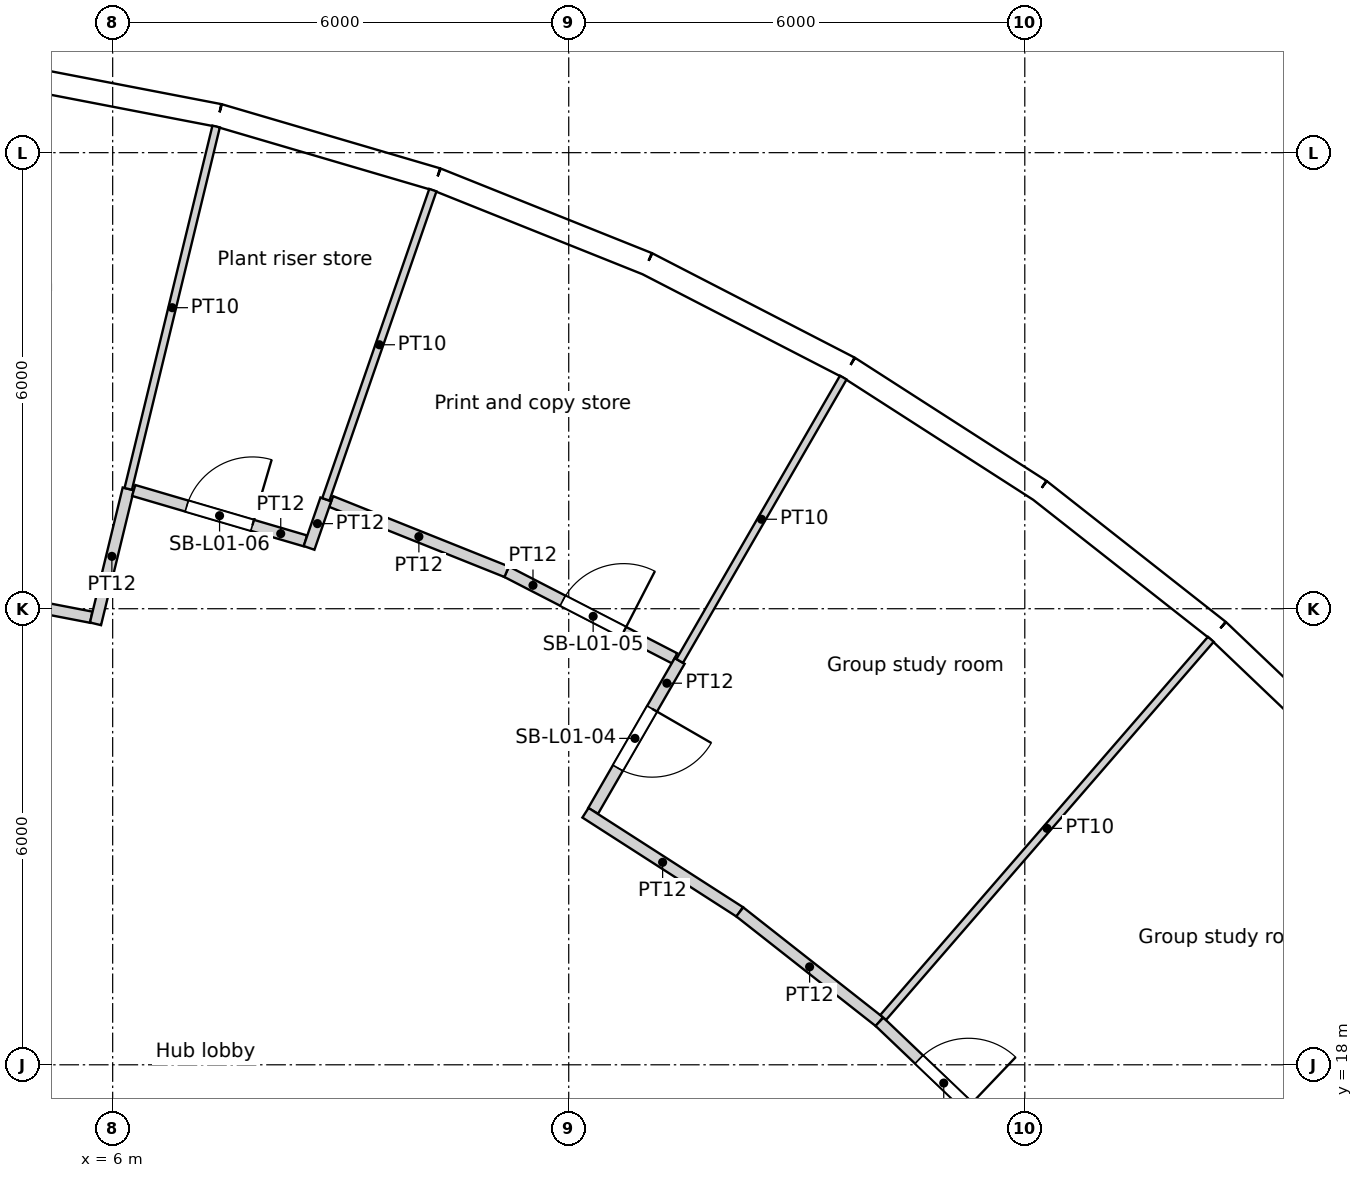
"""IFC4 building model, lengths in metres.
Left out: names, types, materials, properties, quantities, classifications, styles, units other than length and angle.
Written with IfcOpenShell. Run it as: python <this file> out.ifc"""

import sys

from ifc_helpers import new_model, si_unit, direction, frame, frame_2d, origin, origin_2d, place, context, subcontext, project, spatial, rectangle, circle, extrude, element, fill, save


model = new_model("IFC4")
c1 = context("Model", 3, precision=1e-05, world=origin(), true_north=direction((0.0, 1.0)))
c2 = subcontext(c1, "Body", "Model", "MODEL_VIEW")
j1 = project(units=[si_unit("LENGTHUNIT", "METRE"), si_unit("PLANEANGLEUNIT", "RADIAN")], contexts=[c1])
p1 = place(None, origin())
s1 = spatial("IfcSite", under=j1, at=p1, CompositionType="ELEMENT")
p2 = place(p1, origin())
s2 = spatial("IfcBuilding", under=s1, at=p2, CompositionType="ELEMENT")
p3 = place(p2, frame((0.0, 0.0, 9.0)))
s3 = spatial("IfcBuildingStorey", under=s2, at=p3, CompositionType="ELEMENT", Elevation=9.0)
for number, where, z_axis, x_axis in (
    (1, (21.911, 20.892, 0.0), (0.0, 0.0, 1.0), (1.0, 0.0, 0.0)),
    (2, (17.561, 24.661, 0.0), (0.0, 0.0, 1.0), (1.0, 0.0, 0.0)),
    (3, (12.576, 27.539, 0.0), (0.0, 0.0, 1.0), (1.0, 0.0, 0.0)),
    (4, (7.137, 29.421, 0.0), (0.0, 0.0, 1.0), (1.0, 0.0, 0.0)),
):
    element("IfcColumn", number, at=place(p3, frame(where, z_axis=z_axis, x_axis=x_axis)), inside=s3, PredefinedType="COLUMN", context=c2, shape_type="SweptSolid", body=[
        extrude(circle(Radius=0.7, at=origin_2d()), origin(), (0.0, 0.0, 1.0), 4.8),
    ])
for number, where, z_axis, x_axis in (
    (5, (14.659, 19.69, 0.0), (0.0, 0.0, 1.0), (1.0, 0.0, 0.0)),
    (6, (9.723, 22.54, 0.0), (0.0, 0.0, 1.0), (1.0, 0.0, 0.0)),
):
    element("IfcColumn", number, at=place(p3, frame(where, z_axis=z_axis, x_axis=x_axis)), inside=s3, PredefinedType="COLUMN", context=c2, shape_type="SweptSolid", body=[
        extrude(circle(Radius=0.75, at=origin_2d()), origin(), (0.0, 0.0, 1.0), 4.8),
    ])
p4 = place(p3, frame((6.876, 17.521, 0.0), z_axis=(0.0, 0.0, 1.0), x_axis=(1.0, 0.0, 0.0)))
e7 = element("IfcColumn", 7, at=p4, inside=s3, PredefinedType="COLUMN", context=c2, shape_type="SweptSolid", body=[
    extrude(circle(Radius=0.8, at=origin_2d()), origin(), (0.0, 0.0, 1.0), 4.8),
])
p5 = place(p3, frame((22.707, 21.651, 0.0), z_axis=(0.0, 0.0, 1.0), x_axis=(-0.723750841228, 0.690061388444, 0.0)))
e8 = element("IfcWall", 8, at=p5, inside=s3, PredefinedType="SOLIDWALL", context=c2, shape_type="SweptSolid", body=[
    extrude(rectangle(XDim=2.986, YDim=0.3, at=frame_2d((1.493, 0.0))), origin(), (0.0, 0.0, 1.0), 4.35),
])
p6 = place(p5, frame((1.493, 0.0, 2.0)))
e9 = element("IfcOpeningElement", 9, at=p6, cuts=e8, PredefinedType="OPENING", context=c2, shape_type="SweptSolid", body=[
    extrude(circle(Radius=1.2, at=origin_2d()), frame((0.0, 0.16, 0.0), z_axis=(0.0, -1.0, 0.0), x_axis=(1.0, 0.0, 0.0)), (0.0, 0.0, 1.0), 0.32),
])
p7 = place(p3, frame((20.546, 23.711, 0.0), z_axis=(0.0, 0.0, 1.0), x_axis=(-0.786043032847, 0.618171780747, 0.0)))
e10 = element("IfcWall", 10, at=p7, inside=s3, PredefinedType="SOLIDWALL", context=c2, shape_type="SweptSolid", body=[
    extrude(rectangle(XDim=2.986, YDim=0.3, at=frame_2d((1.493, 0.0))), origin(), (0.0, 0.0, 1.0), 4.35),
])
p8 = place(p7, frame((1.493, 0.0, 2.0)))
e11 = element("IfcOpeningElement", 11, at=p8, cuts=e10, PredefinedType="OPENING", context=c2, shape_type="SweptSolid", body=[
    extrude(circle(Radius=1.2, at=origin_2d()), frame((0.0, 0.16, 0.0), z_axis=(0.0, -1.0, 0.0), x_axis=(1.0, 0.0, 0.0)), (0.0, 0.0, 1.0), 0.32),
])
p9 = place(p3, frame((18.199, 25.557, 0.0), z_axis=(0.0, 0.0, 1.0), x_axis=(-0.841242231846, 0.540658401727, 0.0)))
e12 = element("IfcWall", 12, at=p9, inside=s3, PredefinedType="SOLIDWALL", context=c2, shape_type="SweptSolid", body=[
    extrude(rectangle(XDim=2.986, YDim=0.3, at=frame_2d((1.493, 0.0))), origin(), (0.0, 0.0, 1.0), 4.35),
])
p10 = place(p9, frame((1.493, 0.0, 2.0)))
e13 = element("IfcOpeningElement", 13, at=p10, cuts=e12, PredefinedType="OPENING", context=c2, shape_type="SweptSolid", body=[
    extrude(circle(Radius=1.2, at=origin_2d()), frame((0.0, 0.16, 0.0), z_axis=(0.0, -1.0, 0.0), x_axis=(1.0, 0.0, 0.0)), (0.0, 0.0, 1.0), 0.32),
])
p11 = place(p3, frame((15.687, 27.171, 0.0), z_axis=(0.0, 0.0, 1.0), x_axis=(-0.888831268481, 0.458234630043, 0.0)))
e14 = element("IfcWall", 14, at=p11, inside=s3, PredefinedType="SOLIDWALL", context=c2, shape_type="SweptSolid", body=[
    extrude(rectangle(XDim=2.986, YDim=0.3, at=frame_2d((1.493, 0.0))), origin(), (0.0, 0.0, 1.0), 4.35),
])
p12 = place(p11, frame((1.493, 0.0, 2.0)))
e15 = element("IfcOpeningElement", 15, at=p12, cuts=e14, PredefinedType="OPENING", context=c2, shape_type="SweptSolid", body=[
    extrude(circle(Radius=1.2, at=origin_2d()), frame((0.0, 0.16, 0.0), z_axis=(0.0, -1.0, 0.0), x_axis=(1.0, 0.0, 0.0)), (0.0, 0.0, 1.0), 0.32),
])
p13 = place(p3, frame((13.033, 28.539, 0.0), z_axis=(0.0, 0.0, 1.0), x_axis=(-0.928380795373, 0.371630325434, 0.0)))
e16 = element("IfcWall", 16, at=p13, inside=s3, PredefinedType="SOLIDWALL", context=c2, shape_type="SweptSolid", body=[
    extrude(rectangle(XDim=2.986, YDim=0.3, at=frame_2d((1.493, 0.0))), origin(), (0.0, 0.0, 1.0), 4.35),
])
p14 = place(p13, frame((1.493, 0.0, 2.0)))
e17 = element("IfcOpeningElement", 17, at=p14, cuts=e16, PredefinedType="OPENING", context=c2, shape_type="SweptSolid", body=[
    extrude(circle(Radius=1.2, at=origin_2d()), frame((0.0, 0.16, 0.0), z_axis=(0.0, -1.0, 0.0), x_axis=(1.0, 0.0, 0.0)), (0.0, 0.0, 1.0), 0.32),
])
p15 = place(p3, frame((10.261, 29.649, 0.0), z_axis=(0.0, 0.0, 1.0), x_axis=(-0.959502108153, 0.281701445593, 0.0)))
e18 = element("IfcWall", 18, at=p15, inside=s3, PredefinedType="SOLIDWALL", context=c2, shape_type="SweptSolid", body=[
    extrude(rectangle(XDim=2.986, YDim=0.3, at=frame_2d((1.493, 0.0))), origin(), (0.0, 0.0, 1.0), 4.35),
])
p16 = place(p15, frame((1.493, 0.0, 2.0)))
e19 = element("IfcOpeningElement", 19, at=p16, cuts=e18, PredefinedType="OPENING", context=c2, shape_type="SweptSolid", body=[
    extrude(circle(Radius=1.2, at=origin_2d()), frame((0.0, 0.16, 0.0), z_axis=(0.0, -1.0, 0.0), x_axis=(1.0, 0.0, 0.0)), (0.0, 0.0, 1.0), 0.32),
])
p17 = place(p3, frame((7.397, 30.49, 0.0), z_axis=(0.0, 0.0, 1.0), x_axis=(-0.981918853666, 0.189302310646, 0.0)))
e20 = element("IfcWall", 20, at=p17, inside=s3, PredefinedType="SOLIDWALL", context=c2, shape_type="SweptSolid", body=[
    extrude(rectangle(XDim=2.986, YDim=0.3, at=frame_2d((1.493, 0.0))), origin(), (0.0, 0.0, 1.0), 4.35),
])
p18 = place(p17, frame((1.493, 0.0, 2.0)))
e21 = element("IfcOpeningElement", 21, at=p18, cuts=e20, PredefinedType="OPENING", context=c2, shape_type="SweptSolid", body=[
    extrude(circle(Radius=1.2, at=origin_2d()), frame((0.0, 0.16, 0.0), z_axis=(0.0, -1.0, 0.0), x_axis=(1.0, 0.0, 0.0)), (0.0, 0.0, 1.0), 0.32),
])
p19 = place(p3, frame((5.718, 23.888, 0.0), z_axis=(0.0, 0.0, 1.0), x_axis=(-0.981934043808, 0.18922350174, 0.0)))
e22 = element("IfcWall", 22, at=p19, inside=s3, PredefinedType="PARTITIONING", context=c2, shape_type="SweptSolid", body=[
    extrude(rectangle(XDim=2.263, YDim=0.15, at=frame_2d((1.131, 0.0))), origin(), (0.0, 0.0, 1.0), 3.75),
])
p20 = place(p3, frame((6.205, 25.577, 0.0), z_axis=(0.0, 0.0, 1.0), x_axis=(-0.235707106262, -0.9718241405, 0.0)))
e23 = element("IfcWall", 23, at=p20, inside=s3, PredefinedType="PARTITIONING", context=c2, shape_type="SweptSolid", body=[
    extrude(rectangle(XDim=1.827, YDim=0.15, at=frame_2d((0.914, 0.0))), origin(), (0.0, 0.0, 1.0), 3.75),
])
p21 = place(p3, frame((7.361, 30.344, 0.0), z_axis=(0.0, 0.0, 1.0), x_axis=(-0.235760987456, -0.971811070524, 0.0)))
e24 = element("IfcWall", 24, at=p21, inside=s3, PredefinedType="PARTITIONING", context=c2, shape_type="SweptSolid", body=[
    extrude(rectangle(XDim=4.905, YDim=0.1, at=frame_2d((2.453, 0.0))), origin(), (0.0, 0.0, 1.0), 3.75),
])
p22 = place(p3, frame((6.277, 25.556, 0.0), z_axis=(0.0, 0.0, 1.0), x_axis=(0.959490897596, -0.281739627015, 0.0)))
e25 = element("IfcWall", 25, at=p22, inside=s3, PredefinedType="PARTITIONING", context=c2, shape_type="SweptSolid", body=[
    extrude(rectangle(XDim=2.354, YDim=0.15, at=frame_2d((1.177, 0.0))), origin(), (0.0, 0.0, 1.0), 3.75),
])
p23 = place(p22, frame((0.727, 0.0, 0.0)))
e26 = element("IfcOpeningElement", 26, at=p23, cuts=e25, PredefinedType="OPENING", context=c2, shape_type="SweptSolid", body=[
    extrude(rectangle(XDim=0.9, YDim=2.1, at=frame_2d((0.45, 1.05))), frame((0.0, 0.075, 0.0), z_axis=(0.0, -1.0, 0.0), x_axis=(1.0, 0.0, 0.0)), (0.0, 0.0, 1.0), 0.15),
])
p24 = place(p3, frame((8.804, 25.439, 0.0), z_axis=(0.0, 0.0, 1.0), x_axis=(-0.327048503279, -0.945007553675, 0.0)))
e27 = element("IfcWall", 27, at=p24, inside=s3, PredefinedType="PARTITIONING", context=c2, shape_type="SweptSolid", body=[
    extrude(rectangle(XDim=0.676, YDim=0.15, at=frame_2d((0.338, 0.0))), origin(), (0.0, 0.0, 1.0), 3.75),
])
p25 = place(p3, frame((10.212, 29.507, 0.0), z_axis=(0.0, 0.0, 1.0), x_axis=(-0.327044339436, -0.945008994689, 0.0)))
e28 = element("IfcWall", 28, at=p25, inside=s3, PredefinedType="PARTITIONING", context=c2, shape_type="SweptSolid", body=[
    extrude(rectangle(XDim=4.305, YDim=0.1, at=frame_2d((2.153, 0.0))), origin(), (0.0, 0.0, 1.0), 3.75),
])
p26 = place(p3, frame((11.183, 24.487, 0.0), z_axis=(0.0, 0.0, 1.0), x_axis=(-0.928375081541, 0.371644599009, 0.0)))
e29 = element("IfcWall", 29, at=p26, inside=s3, PredefinedType="PARTITIONING", context=c2, shape_type="SweptSolid", body=[
    extrude(rectangle(XDim=2.486, YDim=0.15, at=frame_2d((1.243, 0.0))), origin(), (0.0, 0.0, 1.0), 3.75),
])
p27 = place(p3, frame((11.183, 24.487, 0.0), z_axis=(0.0, 0.0, 1.0), x_axis=(0.888861893738, -0.458175221789, 0.0)))
e30 = element("IfcWall", 30, at=p27, inside=s3, PredefinedType="PARTITIONING", context=c2, shape_type="SweptSolid", body=[
    extrude(rectangle(XDim=2.487, YDim=0.15, at=frame_2d((1.243, 0.0))), origin(), (0.0, 0.0, 1.0), 3.75),
])
p28 = place(p27, frame((0.831, 0.0, 0.0)))
e31 = element("IfcOpeningElement", 31, at=p28, cuts=e30, PredefinedType="OPENING", context=c2, shape_type="SweptSolid", body=[
    extrude(rectangle(XDim=0.9, YDim=2.1, at=frame_2d((0.45, 1.05))), frame((0.0, 0.075, 0.0), z_axis=(0.0, -1.0, 0.0), x_axis=(1.0, 0.0, 0.0)), (0.0, 0.0, 1.0), 0.15),
])
p29 = place(p3, frame((13.46, 23.313, 0.0), z_axis=(0.0, 0.0, 1.0), x_axis=(-0.500000789788, -0.8660249478, 0.0)))
e32 = element("IfcWall", 32, at=p29, inside=s3, PredefinedType="PARTITIONING", context=c2, shape_type="SweptSolid", body=[
    extrude(rectangle(XDim=2.278, YDim=0.15, at=frame_2d((1.139, 0.0))), origin(), (0.0, 0.0, 1.0), 3.75),
])
p30 = place(p29, frame((0.726, 0.0, 0.0)))
e33 = element("IfcOpeningElement", 33, at=p30, cuts=e32, PredefinedType="OPENING", context=c2, shape_type="SweptSolid", body=[
    extrude(rectangle(XDim=0.9, YDim=2.1, at=frame_2d((0.45, 1.05))), frame((0.0, 0.075, 0.0), z_axis=(0.0, -1.0, 0.0), x_axis=(1.0, 0.0, 0.0)), (0.0, 0.0, 1.0), 0.15),
])
p31 = place(p3, frame((14.25, 20.011, 0.0), z_axis=(0.0, 0.0, 1.0), x_axis=(-0.8412573693, 0.540634847747, 0.0)))
e34 = element("IfcWall", 34, at=p31, inside=s3, PredefinedType="PARTITIONING", context=c2, shape_type="SweptSolid", body=[
    extrude(rectangle(XDim=2.413, YDim=0.15, at=frame_2d((1.207, 0.0))), origin(), (0.0, 0.0, 1.0), 3.75),
])
p32 = place(p3, frame((15.612, 27.041, 0.0), z_axis=(0.0, 0.0, 1.0), x_axis=(-0.499994104079, -0.866028807769, 0.0)))
e35 = element("IfcWall", 35, at=p32, inside=s3, PredefinedType="PARTITIONING", context=c2, shape_type="SweptSolid", body=[
    extrude(rectangle(XDim=4.305, YDim=0.1, at=frame_2d((2.152, 0.0))), origin(), (0.0, 0.0, 1.0), 3.75),
])
p33 = place(p3, frame((16.088, 18.566, 0.0), z_axis=(0.0, 0.0, 1.0), x_axis=(-0.786108126536, 0.618089001191, 0.0)))
e36 = element("IfcWall", 36, at=p33, inside=s3, PredefinedType="PARTITIONING", context=c2, shape_type="SweptSolid", body=[
    extrude(rectangle(XDim=2.338, YDim=0.15, at=frame_2d((1.169, 0.0))), origin(), (0.0, 0.0, 1.0), 3.75),
])
p34 = place(p3, frame((16.088, 18.566, 0.0), z_axis=(0.0, 0.0, 1.0), x_axis=(0.723668407542, -0.690147836283, 0.0)))
e37 = element("IfcWall", 37, at=p34, inside=s3, PredefinedType="PARTITIONING", context=c2, shape_type="SweptSolid", body=[
    extrude(rectangle(XDim=2.338, YDim=0.15, at=frame_2d((1.169, 0.0))), origin(), (0.0, 0.0, 1.0), 3.75),
])
p35 = place(p34, frame((0.719, 0.0, 0.0)))
e38 = element("IfcOpeningElement", 38, at=p35, cuts=e37, PredefinedType="OPENING", context=c2, shape_type="SweptSolid", body=[
    extrude(rectangle(XDim=0.9, YDim=2.1, at=frame_2d((0.45, 1.05))), frame((0.0, 0.075, 0.0), z_axis=(0.0, -1.0, 0.0), x_axis=(1.0, 0.0, 0.0)), (0.0, 0.0, 1.0), 0.15),
])
p36 = place(p3, frame((20.448, 23.598, 0.0), z_axis=(0.0, 0.0, 1.0), x_axis=(-0.654862756926, -0.755747821427, 0.0)))
e39 = element("IfcWall", 39, at=p36, inside=s3, PredefinedType="PARTITIONING", context=c2, shape_type="SweptSolid", body=[
    extrude(rectangle(XDim=6.582, YDim=0.1, at=frame_2d((3.291, 0.0))), origin(), (0.0, 0.0, 1.0), 3.75),
])
p37 = place(p3, frame((24.544, 19.302, 0.0), z_axis=(0.0, 0.0, 1.0), x_axis=(-0.786055722677, -0.618155644515, 0.0)))
e40 = element("IfcWall", 40, at=p37, inside=s3, PredefinedType="PARTITIONING", context=c2, shape_type="SweptSolid", body=[
    extrude(rectangle(XDim=6.583, YDim=0.1, at=frame_2d((3.291, 0.0))), origin(), (0.0, 0.0, 1.0), 3.75),
])
p38 = place(p6, origin())
e41 = element("IfcWindow", 41, at=p38, inside=s3, PartitioningType="SINGLE_PANEL", PredefinedType="WINDOW", context=c2, shape_type="SweptSolid", body=[
    extrude(circle(Radius=1.2, at=origin_2d()), frame((0.0, 0.12, 0.0), z_axis=(0.0, -1.0, 0.0), x_axis=(1.0, 0.0, 0.0)), (0.0, 0.0, 1.0), 0.1),
])
fill(e9, e41)
p39 = place(p8, origin())
e42 = element("IfcWindow", 42, at=p39, inside=s3, PartitioningType="SINGLE_PANEL", PredefinedType="WINDOW", context=c2, shape_type="SweptSolid", body=[
    extrude(circle(Radius=1.2, at=origin_2d()), frame((0.0, 0.12, 0.0), z_axis=(0.0, -1.0, 0.0), x_axis=(1.0, 0.0, 0.0)), (0.0, 0.0, 1.0), 0.1),
])
fill(e11, e42)
p40 = place(p10, origin())
e43 = element("IfcWindow", 43, at=p40, inside=s3, PartitioningType="SINGLE_PANEL", PredefinedType="WINDOW", context=c2, shape_type="SweptSolid", body=[
    extrude(circle(Radius=1.2, at=origin_2d()), frame((0.0, 0.12, 0.0), z_axis=(0.0, -1.0, 0.0), x_axis=(1.0, 0.0, 0.0)), (0.0, 0.0, 1.0), 0.1),
])
fill(e13, e43)
p41 = place(p12, origin())
e44 = element("IfcWindow", 44, at=p41, inside=s3, PartitioningType="SINGLE_PANEL", PredefinedType="WINDOW", context=c2, shape_type="SweptSolid", body=[
    extrude(circle(Radius=1.2, at=origin_2d()), frame((0.0, 0.12, 0.0), z_axis=(0.0, -1.0, 0.0), x_axis=(1.0, 0.0, 0.0)), (0.0, 0.0, 1.0), 0.1),
])
fill(e15, e44)
p42 = place(p14, origin())
e45 = element("IfcWindow", 45, at=p42, inside=s3, PartitioningType="SINGLE_PANEL", PredefinedType="WINDOW", context=c2, shape_type="SweptSolid", body=[
    extrude(circle(Radius=1.2, at=origin_2d()), frame((0.0, 0.12, 0.0), z_axis=(0.0, -1.0, 0.0), x_axis=(1.0, 0.0, 0.0)), (0.0, 0.0, 1.0), 0.1),
])
fill(e17, e45)
p43 = place(p16, origin())
e46 = element("IfcWindow", 46, at=p43, inside=s3, PartitioningType="SINGLE_PANEL", PredefinedType="WINDOW", context=c2, shape_type="SweptSolid", body=[
    extrude(circle(Radius=1.2, at=origin_2d()), frame((0.0, 0.12, 0.0), z_axis=(0.0, -1.0, 0.0), x_axis=(1.0, 0.0, 0.0)), (0.0, 0.0, 1.0), 0.1),
])
fill(e19, e46)
p44 = place(p18, origin())
e47 = element("IfcWindow", 47, at=p44, inside=s3, PartitioningType="SINGLE_PANEL", PredefinedType="WINDOW", context=c2, shape_type="SweptSolid", body=[
    extrude(circle(Radius=1.2, at=origin_2d()), frame((0.0, 0.12, 0.0), z_axis=(0.0, -1.0, 0.0), x_axis=(1.0, 0.0, 0.0)), (0.0, 0.0, 1.0), 0.1),
])
fill(e21, e47)
p45 = place(p35, origin())
e48 = element("IfcDoor", 48, at=p45, inside=s3, OperationType="SINGLE_SWING_RIGHT", PredefinedType="DOOR", context=c2, shape_type="SweptSolid", body=[
    extrude(rectangle(XDim=0.9, YDim=2.1, at=frame_2d((0.45, 1.05))), frame((0.0, 0.025, 0.0), z_axis=(0.0, -1.0, 0.0), x_axis=(1.0, 0.0, 0.0)), (0.0, 0.0, 1.0), 0.05),
])
fill(e38, e48)
p46 = place(p30, origin())
e49 = element("IfcDoor", 49, at=p46, inside=s3, OperationType="SINGLE_SWING_LEFT", PredefinedType="DOOR", context=c2, shape_type="SweptSolid", body=[
    extrude(rectangle(XDim=0.9, YDim=2.1, at=frame_2d((0.45, 1.05))), frame((0.0, 0.025, 0.0), z_axis=(0.0, -1.0, 0.0), x_axis=(1.0, 0.0, 0.0)), (0.0, 0.0, 1.0), 0.05),
])
fill(e33, e49)
p47 = place(p28, origin())
e50 = element("IfcDoor", 50, at=p47, inside=s3, OperationType="SINGLE_SWING_RIGHT", PredefinedType="DOOR", context=c2, shape_type="SweptSolid", body=[
    extrude(rectangle(XDim=0.9, YDim=2.1, at=frame_2d((0.45, 1.05))), frame((0.0, 0.025, 0.0), z_axis=(0.0, -1.0, 0.0), x_axis=(1.0, 0.0, 0.0)), (0.0, 0.0, 1.0), 0.05),
])
fill(e31, e50)
p48 = place(p23, origin())
e51 = element("IfcDoor", 51, at=p48, inside=s3, OperationType="SINGLE_SWING_RIGHT", PredefinedType="DOOR", context=c2, shape_type="SweptSolid", body=[
    extrude(rectangle(XDim=0.9, YDim=2.1, at=frame_2d((0.45, 1.05))), frame((0.0, 0.025, 0.0), z_axis=(0.0, -1.0, 0.0), x_axis=(1.0, 0.0, 0.0)), (0.0, 0.0, 1.0), 0.05),
])
fill(e26, e51)
save(model, sys.argv[1])
